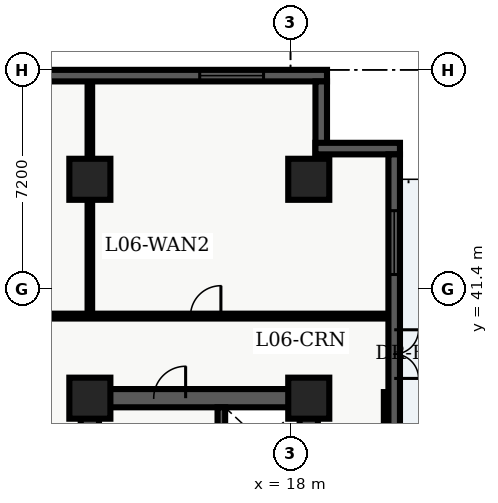
"""IFC4 building model, lengths in metres.
Left out: names, types, materials, properties, quantities, classifications, styles, units other than length and angle.
Written with IfcOpenShell. Run it as: python <this file> out.ifc"""

import sys

from ifc_helpers import new_model, entity, si_unit, converted_unit, direction, frame, origin_with_axes, origin_2d_with_axis, place, context, subcontext, project, spatial, polyline, rectangle, outline, extrude, element, fill, save


model = new_model("IFC4")
c1 = context("Model", 3, precision=1e-05, world=origin_with_axes(), true_north=direction((0.0, 1.0)))
c2 = subcontext(c1, "Body", "Model", "MODEL_VIEW")
j1 = project(units=[si_unit("LENGTHUNIT", "METRE"), converted_unit("PLANEANGLEUNIT", "DEGREE", entity("IfcPlaneAngleMeasure", 0.017), si_unit("PLANEANGLEUNIT", "RADIAN"), dimensions=[0, 0, 0, 0, 0, 0, 0])], contexts=[c1])
p1 = place(None, origin_with_axes())
s1 = spatial("IfcSite", under=j1, at=p1, CompositionType="ELEMENT")
p2 = place(p1, origin_with_axes())
s2 = spatial("IfcBuilding", under=s1, at=p2, CompositionType="ELEMENT")
p3 = place(p2, frame((0.0, 0.0, 28.8), z_axis=(0.0, 0.0, 1.0), x_axis=(1.0, 0.0, 0.0)))
s3 = spatial("IfcBuildingStorey", under=s2, at=p3, CompositionType="ELEMENT", Elevation=28.8)
p4 = place(p3, frame((11.4, 10.8, 0.0), z_axis=(0.0, 0.0, 1.0), x_axis=(0.0, 1.0, 0.0)))
e1 = element("IfcWall", 1, at=p4, inside=s3, PredefinedType="SHEAR", context=c2, shape_type="SweptSolid", body=[
    extrude(outline(polyline([(0.0, -0.3), (27.0, -0.3), (27.0, 0.3), (0.0, 0.3), (0.0, -0.3)])), origin_with_axes(), (0.0, 0.0, 1.0), 3.66),
])
p5 = place(p3, frame((11.4, 37.8, 0.0), z_axis=(0.0, 0.0, 1.0), x_axis=(1.0, 0.0, 0.0)))
e2 = element("IfcWall", 2, at=p5, inside=s3, PredefinedType="SHEAR", context=c2, shape_type="SweptSolid", body=[
    extrude(outline(polyline([(0.0, -0.3), (7.2, -0.3), (7.2, 0.3), (0.0, 0.3), (0.0, -0.3)])), origin_with_axes(), (0.0, 0.0, 1.0), 3.66),
])
p6 = place(p5, frame((2.625, 0.0, 0.0), z_axis=(0.0, 0.0, 1.0), x_axis=(1.0, 0.0, 0.0)))
e3 = element("IfcOpeningElement", 3, at=p6, cuts=e2, PredefinedType="OPENING", context=c2, shape_type="SweptSolid", body=[
    extrude(rectangle(XDim=1.05, YDim=0.62, at=origin_2d_with_axis()), origin_with_axes(), (0.0, 0.0, 1.0), 2.15),
])
p7 = place(p3, frame((18.6, 24.3, 0.0), z_axis=(0.0, 0.0, 1.0), x_axis=(0.0, 1.0, 0.0)))
e4 = element("IfcWall", 4, at=p7, inside=s3, PredefinedType="SHEAR", context=c2, shape_type="SweptSolid", body=[
    extrude(outline(polyline([(0.0, -0.3), (13.5, -0.3), (13.5, 0.3), (0.0, 0.3), (0.0, -0.3)])), origin_with_axes(), (0.0, 0.0, 1.0), 3.66),
])
p8 = place(p7, frame((6.025, 0.0, 0.0), z_axis=(0.0, 0.0, 1.0), x_axis=(1.0, 0.0, 0.0)))
e5 = element("IfcOpeningElement", 5, at=p8, cuts=e4, PredefinedType="OPENING", context=c2, shape_type="SweptSolid", body=[
    extrude(rectangle(XDim=0.95, YDim=0.62, at=origin_2d_with_axis()), origin_with_axes(), (0.0, 0.0, 1.0), 2.15),
])
p9 = place(p7, frame((7.825, 0.0, 0.0), z_axis=(0.0, 0.0, 1.0), x_axis=(1.0, 0.0, 0.0)))
e6 = element("IfcOpeningElement", 6, at=p9, cuts=e4, PredefinedType="OPENING", context=c2, shape_type="SweptSolid", body=[
    extrude(rectangle(XDim=0.95, YDim=0.62, at=origin_2d_with_axis()), origin_with_axes(), (0.0, 0.0, 1.0), 2.15),
])
p10 = place(p3, frame((15.725, 28.9, 0.0), z_axis=(0.0, 0.0, 1.0), x_axis=(0.0, 1.0, 0.0)))
e7 = element("IfcWall", 7, at=p10, inside=s3, PredefinedType="SHEAR", context=c2, shape_type="SweptSolid", body=[
    extrude(outline(polyline([(0.0, -0.125), (8.6, -0.125), (8.6, 0.125), (0.0, 0.125), (0.0, -0.125)])), origin_with_axes(), (0.0, 0.0, 1.0), 3.66),
])
for number, where, z_axis, x_axis in (
    (8, (11.4, 37.8, 0.0), (0.0, 0.0, 1.0), (1.0, 0.0, 0.0)),
    (9, (11.4, 45.0, 0.0), (0.0, 0.0, 1.0), (1.0, 0.0, 0.0)),
    (10, (18.6, 37.8, 0.0), (0.0, 0.0, 1.0), (1.0, 0.0, 0.0)),
    (11, (18.6, 45.0, 0.0), (0.0, 0.0, 1.0), (1.0, 0.0, 0.0)),
):
    element("IfcColumn", number, at=place(p3, frame(where, z_axis=z_axis, x_axis=x_axis)), inside=s3, PredefinedType="COLUMN", context=c2, shape_type="SweptSolid", body=[
        extrude(rectangle(XDim=1.35, YDim=1.35, at=origin_2d_with_axis()), origin_with_axes(), (0.0, 0.0, 1.0), 3.9),
    ])
p11 = place(p3, frame((2.6, 40.5, 0.0), z_axis=(0.0, 0.0, 1.0), x_axis=(1.0, 0.0, 0.0)))
e12 = element("IfcWall", 12, at=p11, inside=s3, PredefinedType="PARTITIONING", context=c2, shape_type="SweptSolid", body=[
    extrude(outline(polyline([(0.0, -0.08), (18.65, -0.08), (18.65, 0.08), (0.0, 0.08), (0.0, -0.08)])), origin_with_axes(), (0.0, 0.0, 1.0), 2.7),
])
p12 = place(p11, frame((4.395, 0.0, 0.0), z_axis=(0.0, 0.0, 1.0), x_axis=(1.0, 0.0, 0.0)))
e13 = element("IfcOpeningElement", 13, at=p12, cuts=e12, PredefinedType="OPENING", context=c2, shape_type="SweptSolid", body=[
    extrude(rectangle(XDim=1.2, YDim=0.18, at=origin_2d_with_axis()), origin_with_axes(), (0.0, 0.0, 1.0), 2.2),
])
p13 = place(p11, frame((12.61, 0.0, 0.0), z_axis=(0.0, 0.0, 1.0), x_axis=(1.0, 0.0, 0.0)))
e14 = element("IfcOpeningElement", 14, at=p13, cuts=e12, PredefinedType="OPENING", context=c2, shape_type="SweptSolid", body=[
    extrude(rectangle(XDim=1.0, YDim=0.18, at=origin_2d_with_axis()), origin_with_axes(), (0.0, 0.0, 1.0), 2.15),
])
p14 = place(p3, frame((21.15, 7.8, 0.0), z_axis=(0.0, 0.0, 1.0), x_axis=(0.0, 1.0, 0.0)))
e15 = element("IfcWall", 15, at=p14, inside=s3, PredefinedType="PARTITIONING", context=c2, shape_type="SweptSolid", body=[
    extrude(outline(polyline([(0.0, -0.08), (30.2, -0.08), (30.2, 0.08), (0.0, 0.08), (0.0, -0.08)])), origin_with_axes(), (0.0, 0.0, 1.0), 2.7),
])
p15 = place(p14, frame((5.775, 0.0, 0.0), z_axis=(0.0, 0.0, 1.0), x_axis=(1.0, 0.0, 0.0)))
e16 = element("IfcOpeningElement", 16, at=p15, cuts=e15, PredefinedType="OPENING", context=c2, shape_type="SweptSolid", body=[
    extrude(rectangle(XDim=1.05, YDim=0.18, at=origin_2d_with_axis()), origin_with_axes(), (0.0, 0.0, 1.0), 2.15),
])
p16 = place(p3, frame((11.4, 40.6, 0.0), z_axis=(0.0, 0.0, 1.0), x_axis=(0.0, 1.0, 0.0)))
e17 = element("IfcWall", 17, at=p16, inside=s3, PredefinedType="PARTITIONING", context=c2, shape_type="SweptSolid", body=[
    extrude(outline(polyline([(0.0, -0.075), (7.64, -0.075), (7.64, 0.075), (0.0, 0.075), (0.0, -0.075)])), origin_with_axes(), (0.0, 0.0, 1.0), 2.7),
])
p17 = place(p3, frame((2.78, 48.41, 0.0), z_axis=(0.0, 0.0, 1.0), x_axis=(1.0, 0.0, 0.0)))
e18 = element("IfcWall", 18, at=p17, inside=s3, PredefinedType="SOLIDWALL", context=c2, shape_type="SweptSolid", body=[
    extrude(outline(polyline([(0.0, -0.19), (16.42, -0.19), (16.42, 0.19), (0.0, 0.19), (0.0, -0.19)])), origin_with_axes(), (0.0, 0.0, 1.0), 3.66),
])
p18 = place(p17, frame((3.137, 0.0, 0.45), z_axis=(0.0, 0.0, 1.0), x_axis=(1.0, 0.0, 0.0)))
e19 = element("IfcOpeningElement", 19, at=p18, cuts=e18, PredefinedType="OPENING", context=c2, shape_type="SweptSolid", body=[
    extrude(rectangle(XDim=2.1, YDim=0.4, at=origin_2d_with_axis()), origin_with_axes(), (0.0, 0.0, 1.0), 2.2),
])
p19 = place(p17, frame((13.283, 0.0, 0.45), z_axis=(0.0, 0.0, 1.0), x_axis=(1.0, 0.0, 0.0)))
e20 = element("IfcOpeningElement", 20, at=p19, cuts=e18, PredefinedType="OPENING", context=c2, shape_type="SweptSolid", body=[
    extrude(rectangle(XDim=2.1, YDim=0.4, at=origin_2d_with_axis()), origin_with_axes(), (0.0, 0.0, 1.0), 2.2),
])
p20 = place(p3, frame((19.01, 48.22, 0.0), z_axis=(0.0, 0.0, 1.0), x_axis=(0.0, -1.0, 0.0)))
e21 = element("IfcWall", 21, at=p20, inside=s3, PredefinedType="SOLIDWALL", context=c2, shape_type="SweptSolid", body=[
    extrude(outline(polyline([(0.0, -0.19), (2.56, -0.19), (2.56, 0.19), (0.0, 0.19), (0.0, -0.19)])), origin_with_axes(), (0.0, 0.0, 1.0), 3.66),
])
p21 = place(p3, frame((18.82, 46.01, 0.0), z_axis=(0.0, 0.0, 1.0), x_axis=(1.0, 0.0, 0.0)))
e22 = element("IfcWall", 22, at=p21, inside=s3, PredefinedType="SOLIDWALL", context=c2, shape_type="SweptSolid", body=[
    extrude(outline(polyline([(0.0, -0.19), (2.78, -0.19), (2.78, 0.19), (0.0, 0.19), (0.0, -0.19)])), origin_with_axes(), (0.0, 0.0, 1.0), 3.66),
])
p22 = place(p3, frame((21.41, 45.82, 0.0), z_axis=(0.0, 0.0, 1.0), x_axis=(0.0, -1.0, 0.0)))
e23 = element("IfcWall", 23, at=p22, inside=s3, PredefinedType="SOLIDWALL", context=c2, shape_type="SweptSolid", body=[
    extrude(outline(polyline([(0.0, -0.19), (24.22, -0.19), (24.22, 0.19), (0.0, 0.19), (0.0, -0.19)])), origin_with_axes(), (0.0, 0.0, 1.0), 3.66),
])
p23 = place(p22, frame((6.57, 0.0, 0.0), z_axis=(0.0, 0.0, 1.0), x_axis=(1.0, 0.0, 0.0)))
e24 = element("IfcOpeningElement", 24, at=p23, cuts=e23, PredefinedType="OPENING", context=c2, shape_type="SweptSolid", body=[
    extrude(rectangle(XDim=1.6, YDim=0.4, at=origin_2d_with_axis()), origin_with_axes(), (0.0, 0.0, 1.0), 2.2),
])
p24 = place(p22, frame((2.902, 0.0, 0.45), z_axis=(0.0, 0.0, 1.0), x_axis=(1.0, 0.0, 0.0)))
e25 = element("IfcOpeningElement", 25, at=p24, cuts=e23, PredefinedType="OPENING", context=c2, shape_type="SweptSolid", body=[
    extrude(rectangle(XDim=2.1, YDim=0.4, at=origin_2d_with_axis()), origin_with_axes(), (0.0, 0.0, 1.0), 2.2),
])
p25 = place(p5, frame((2.625, 0.0, 0.0), z_axis=(0.0, 0.0, 1.0), x_axis=(1.0, 0.0, 0.0)))
e26 = element("IfcDoor", 26, at=p25, inside=s3, OperationType="SINGLE_SWING_RIGHT", PredefinedType="DOOR", context=c2, shape_type="SweptSolid", body=[
    extrude(rectangle(XDim=1.05, YDim=0.09, at=origin_2d_with_axis()), origin_with_axes(), (0.0, 0.0, 1.0), 2.15),
])
fill(e3, e26)
p26 = place(p11, frame((12.61, 0.0, 0.0), z_axis=(0.0, 0.0, 1.0), x_axis=(1.0, 0.0, 0.0)))
e27 = element("IfcDoor", 27, at=p26, inside=s3, OperationType="SINGLE_SWING_RIGHT", PredefinedType="DOOR", context=c2, shape_type="SweptSolid", body=[
    extrude(rectangle(XDim=1.0, YDim=0.09, at=origin_2d_with_axis()), origin_with_axes(), (0.0, 0.0, 1.0), 2.15),
])
fill(e14, e27)
p27 = place(p22, frame((6.57, 0.0, 0.0), z_axis=(0.0, 0.0, 1.0), x_axis=(1.0, 0.0, 0.0)))
e28 = element("IfcDoor", 28, at=p27, inside=s3, OperationType="DOUBLE_DOOR_SINGLE_SWING", PredefinedType="DOOR", context=c2, shape_type="SweptSolid", body=[
    extrude(rectangle(XDim=1.6, YDim=0.09, at=origin_2d_with_axis()), origin_with_axes(), (0.0, 0.0, 1.0), 2.2),
])
fill(e24, e28)
p28 = place(p17, frame((13.283, 0.0, 0.45), z_axis=(0.0, 0.0, 1.0), x_axis=(1.0, 0.0, 0.0)))
e29 = element("IfcWindow", 29, at=p28, inside=s3, PredefinedType="WINDOW", context=c2, shape_type="SweptSolid", body=[
    extrude(rectangle(XDim=2.1, YDim=0.09, at=origin_2d_with_axis()), origin_with_axes(), (0.0, 0.0, 1.0), 2.2),
])
fill(e20, e29)
p29 = place(p22, frame((2.902, 0.0, 0.45), z_axis=(0.0, 0.0, 1.0), x_axis=(1.0, 0.0, 0.0)))
e30 = element("IfcWindow", 30, at=p29, inside=s3, PredefinedType="WINDOW", context=c2, shape_type="SweptSolid", body=[
    extrude(rectangle(XDim=2.1, YDim=0.09, at=origin_2d_with_axis()), origin_with_axes(), (0.0, 0.0, 1.0), 2.2),
])
fill(e25, e30)
save(model, sys.argv[1])
